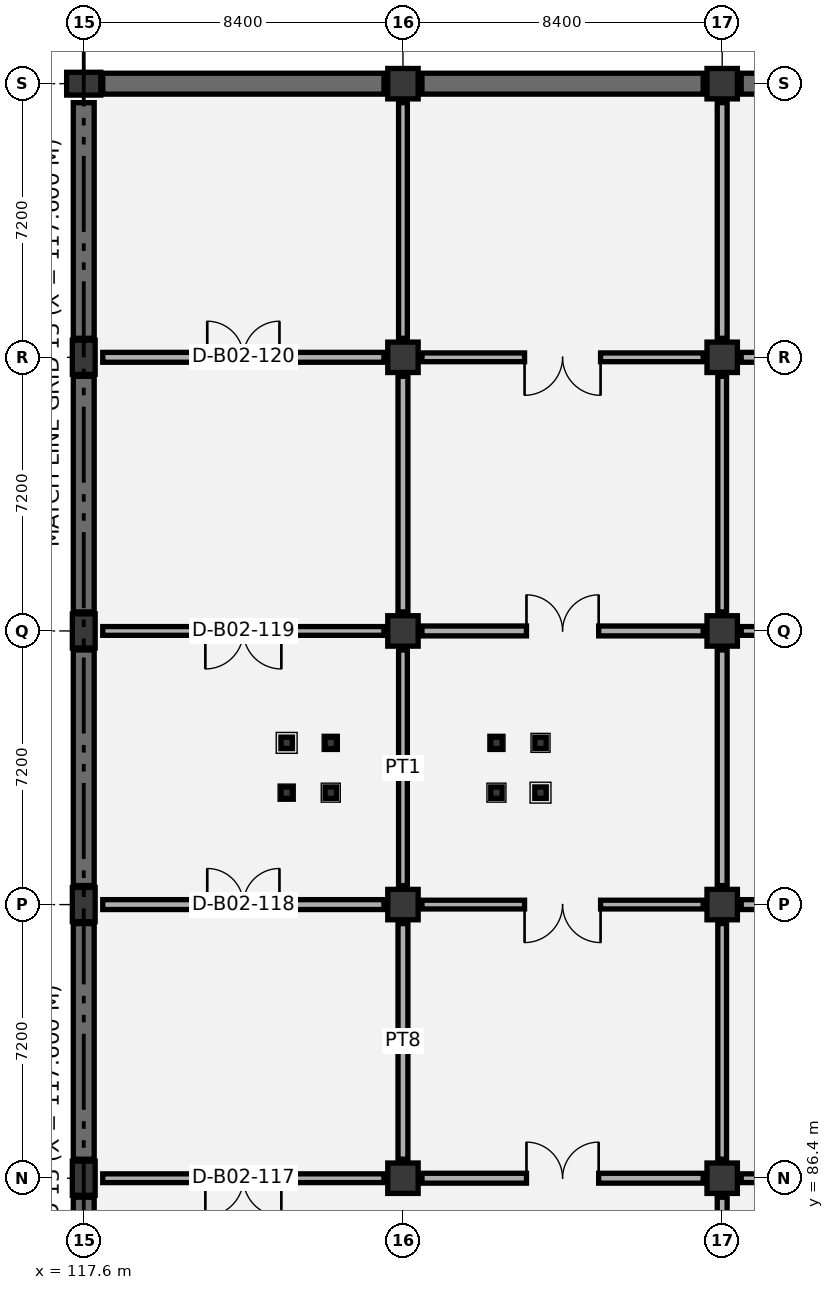
"""IFC4 building model, lengths in metres.
Left out: names, types, materials, properties, quantities, classifications, styles, units other than length and angle.
Written with IfcOpenShell. Run it as: python <this file> out.ifc"""

import sys

from ifc_helpers import new_model, si_unit, direction, frame, frame_2d, origin, origin_2d, place, context, subcontext, project, spatial, rectangle, i_section, extrude, element, fill, save


model = new_model("IFC4")
c1 = context("Model", 3, precision=1e-05, world=origin(), true_north=direction((0.0, 1.0)))
c2 = subcontext(c1, "Body", "Model", "MODEL_VIEW")
j1 = project(units=[si_unit("LENGTHUNIT", "METRE"), si_unit("PLANEANGLEUNIT", "RADIAN")], contexts=[c1])
p1 = place(None, origin())
s1 = spatial("IfcSite", under=j1, at=p1, CompositionType="ELEMENT")
p2 = place(p1, origin())
s2 = spatial("IfcBuilding", under=s1, at=p2, CompositionType="ELEMENT")
p3 = place(p2, frame((0.0, 0.0, -9.6)))
s3 = spatial("IfcBuildingStorey", under=s2, at=p3, CompositionType="ELEMENT", Elevation=-9.6)
for number, where, z_axis, x_axis in (
    (1, (117.6, 86.4, 0.0), (0.0, 0.0, 1.0), (1.0, 0.0, 0.0)),
    (2, (117.6, 93.6, 0.0), (0.0, 0.0, 1.0), (1.0, 0.0, 0.0)),
    (3, (117.6, 100.8, 0.0), (0.0, 0.0, 1.0), (1.0, 0.0, 0.0)),
    (4, (117.6, 108.0, 0.0), (0.0, 0.0, 1.0), (1.0, 0.0, 0.0)),
    (5, (117.6, 115.2, 0.0), (0.0, 0.0, 1.0), (0.0, 1.0, 0.0)),
):
    element("IfcColumn", number, at=place(p3, frame(where, z_axis=z_axis, x_axis=x_axis)), inside=s3, PredefinedType="COLUMN", context=c2, shape_type="SweptSolid", body=[
        extrude(rectangle(XDim=0.6, YDim=0.9, at=origin_2d()), origin(), (0.0, 0.0, 1.0), 4.8),
    ])
for number, where, z_axis, x_axis in (
    (6, (126.0, 86.4, 0.0), (0.0, 0.0, 1.0), (1.0, 0.0, 0.0)),
    (7, (126.0, 93.6, 0.0), (0.0, 0.0, 1.0), (1.0, 0.0, 0.0)),
    (8, (126.0, 100.8, 0.0), (0.0, 0.0, 1.0), (1.0, 0.0, 0.0)),
    (9, (126.0, 108.0, 0.0), (0.0, 0.0, 1.0), (1.0, 0.0, 0.0)),
    (10, (126.0, 115.2, 0.0), (0.0, 0.0, 1.0), (1.0, 0.0, 0.0)),
    (11, (134.4, 86.4, 0.0), (0.0, 0.0, 1.0), (1.0, 0.0, 0.0)),
    (12, (134.4, 93.6, 0.0), (0.0, 0.0, 1.0), (1.0, 0.0, 0.0)),
    (13, (134.4, 100.8, 0.0), (0.0, 0.0, 1.0), (1.0, 0.0, 0.0)),
    (14, (134.4, 108.0, 0.0), (0.0, 0.0, 1.0), (1.0, 0.0, 0.0)),
    (15, (134.4, 115.2, 0.0), (0.0, 0.0, 1.0), (1.0, 0.0, 0.0)),
):
    element("IfcColumn", number, at=place(p3, frame(where, z_axis=z_axis, x_axis=x_axis)), inside=s3, PredefinedType="COLUMN", context=c2, shape_type="SweptSolid", body=[
        extrude(rectangle(XDim=0.8, YDim=0.8, at=origin_2d()), origin(), (0.0, 0.0, 1.0), 4.8),
    ])
for number, where, z_axis, x_axis in (
    (16, (122.94, 96.545, 0.0), (0.0, 0.0, 1.0), (1.0, 0.0, 0.0)),
    (17, (124.1, 96.545, 0.0), (0.0, 0.0, 1.0), (1.0, 0.0, 0.0)),
    (18, (122.94, 97.855, 0.0), (0.0, 0.0, 1.0), (1.0, 0.0, 0.0)),
    (19, (124.1, 97.855, 0.0), (0.0, 0.0, 1.0), (1.0, 0.0, 0.0)),
    (20, (128.46, 96.545, 0.0), (0.0, 0.0, 1.0), (1.0, 0.0, 0.0)),
    (21, (129.62, 96.545, 0.0), (0.0, 0.0, 1.0), (1.0, 0.0, 0.0)),
    (22, (128.46, 97.855, 0.0), (0.0, 0.0, 1.0), (1.0, 0.0, 0.0)),
    (23, (129.62, 97.855, 0.0), (0.0, 0.0, 1.0), (1.0, 0.0, 0.0)),
):
    element("IfcColumn", number, at=place(p3, frame(where, z_axis=z_axis, x_axis=x_axis)), inside=s3, PredefinedType="COLUMN", context=c2, shape_type="SweptSolid", body=[
        extrude(i_section(OverallWidth=0.3, OverallDepth=0.3, WebThickness=0.011, FlangeThickness=0.019, FilletRadius=0.027, at=origin_2d()), origin(), (0.0, 0.0, 1.0), 4.4),
    ])
p4 = place(p3, frame((117.6, 79.7, 0.0), z_axis=(0.0, 0.0, 1.0), x_axis=(0.0, 1.0, 0.0)))
e24 = element("IfcWall", 24, at=p4, inside=s3, PredefinedType="USERDEFINED", context=c2, shape_type="SweptSolid", body=[
    extrude(rectangle(XDim=6.2, YDim=0.55, at=frame_2d((3.1, 0.0))), origin(), (0.0, 0.0, 1.0), 4.4),
])
p5 = place(p3, frame((117.6, 86.9, 0.0), z_axis=(0.0, 0.0, 1.0), x_axis=(0.0, 1.0, 0.0)))
e25 = element("IfcWall", 25, at=p5, inside=s3, PredefinedType="USERDEFINED", context=c2, shape_type="SweptSolid", body=[
    extrude(rectangle(XDim=6.2, YDim=0.55, at=frame_2d((3.1, 0.0))), origin(), (0.0, 0.0, 1.0), 4.4),
])
for number, where, z_axis, x_axis in (
    (26, (117.6, 94.1, 0.0), (0.0, 0.0, 1.0), (0.0, 1.0, 0.0)),
    (27, (117.6, 101.3, 0.0), (0.0, 0.0, 1.0), (0.0, 1.0, 0.0)),
):
    element("IfcWall", number, at=place(p3, frame(where, z_axis=z_axis, x_axis=x_axis)), inside=s3, PredefinedType="USERDEFINED", context=c2, shape_type="SweptSolid", body=[
        extrude(rectangle(XDim=6.2, YDim=0.55, at=frame_2d((3.1, 0.0))), origin(), (0.0, 0.0, 1.0), 4.4),
    ])
p6 = place(p3, frame((118.1, 115.2, 0.0), z_axis=(0.0, 0.0, 1.0), x_axis=(1.0, 0.0, 0.0)))
e28 = element("IfcWall", 28, at=p6, inside=s3, PredefinedType="USERDEFINED", context=c2, shape_type="SweptSolid", body=[
    extrude(rectangle(XDim=7.4, YDim=0.55, at=frame_2d((3.7, 0.0))), origin(), (0.0, 0.0, 1.0), 4.4),
])
p7 = place(p3, frame((117.6, 108.5, 0.0), z_axis=(0.0, 0.0, 1.0), x_axis=(0.0, 1.0, 0.0)))
e29 = element("IfcWall", 29, at=p7, inside=s3, PredefinedType="USERDEFINED", context=c2, shape_type="SweptSolid", body=[
    extrude(rectangle(XDim=6.2, YDim=0.55, at=frame_2d((3.1, 0.0))), origin(), (0.0, 0.0, 1.0), 4.4),
])
p8 = place(p3, frame((126.5, 115.2, 0.0), z_axis=(0.0, 0.0, 1.0), x_axis=(1.0, 0.0, 0.0)))
e30 = element("IfcWall", 30, at=p8, inside=s3, PredefinedType="USERDEFINED", context=c2, shape_type="SweptSolid", body=[
    extrude(rectangle(XDim=7.4, YDim=0.55, at=frame_2d((3.7, 0.0))), origin(), (0.0, 0.0, 1.0), 4.4),
])
p9 = place(p3, frame((134.9, 115.2, 0.0), z_axis=(0.0, 0.0, 1.0), x_axis=(1.0, 0.0, 0.0)))
e31 = element("IfcWall", 31, at=p9, inside=s3, PredefinedType="USERDEFINED", context=c2, shape_type="SweptSolid", body=[
    extrude(rectangle(XDim=7.4, YDim=0.55, at=frame_2d((3.7, 0.0))), origin(), (0.0, 0.0, 1.0), 4.4),
])
p10 = place(p3, frame((118.1, 86.4, 0.0), z_axis=(0.0, 0.0, 1.0), x_axis=(1.0, 0.0, 0.0)))
e32 = element("IfcWall", 32, at=p10, inside=s3, PredefinedType="PARTITIONING", context=c2, shape_type="SweptSolid", body=[
    extrude(rectangle(XDim=7.4, YDim=0.23, at=frame_2d((3.7, 0.0))), origin(), (0.0, 0.0, 1.0), 3.495),
])
p11 = place(p10, frame((2.7, 0.0, 0.0)))
e33 = element("IfcOpeningElement", 33, at=p11, cuts=e32, PredefinedType="OPENING", context=c2, shape_type="SweptSolid", body=[
    extrude(rectangle(XDim=2.0, YDim=2.35, at=frame_2d((1.0, 1.175))), frame((0.0, 0.125, 0.0), z_axis=(0.0, -1.0, 0.0), x_axis=(1.0, 0.0, 0.0)), (0.0, 0.0, 1.0), 0.25),
])
p12 = place(p3, frame((126.0, 86.9, 0.0), z_axis=(0.0, 0.0, 1.0), x_axis=(0.0, 1.0, 0.0)))
e34 = element("IfcWall", 34, at=p12, inside=s3, PredefinedType="PARTITIONING", context=c2, shape_type="SweptSolid", body=[
    extrude(rectangle(XDim=6.2, YDim=0.26, at=frame_2d((3.1, 0.0))), origin(), (0.0, 0.0, 1.0), 3.595),
])
p13 = place(p3, frame((118.1, 93.6, 0.0), z_axis=(0.0, 0.0, 1.0), x_axis=(1.0, 0.0, 0.0)))
e35 = element("IfcWall", 35, at=p13, inside=s3, PredefinedType="PARTITIONING", context=c2, shape_type="SweptSolid", body=[
    extrude(rectangle(XDim=7.4, YDim=0.26, at=frame_2d((3.7, 0.0))), origin(), (0.0, 0.0, 1.0), 3.495),
])
p14 = place(p13, frame((2.75, 0.0, 0.0)))
e36 = element("IfcOpeningElement", 36, at=p14, cuts=e35, PredefinedType="OPENING", context=c2, shape_type="SweptSolid", body=[
    extrude(rectangle(XDim=1.9, YDim=2.3, at=frame_2d((0.95, 1.15))), frame((0.0, 0.14, 0.0), z_axis=(0.0, -1.0, 0.0), x_axis=(1.0, 0.0, 0.0)), (0.0, 0.0, 1.0), 0.28),
])
p15 = place(p3, frame((126.0, 94.1, 0.0), z_axis=(0.0, 0.0, 1.0), x_axis=(0.0, 1.0, 0.0)))
e37 = element("IfcWall", 37, at=p15, inside=s3, PredefinedType="PARTITIONING", context=c2, shape_type="SweptSolid", body=[
    extrude(rectangle(XDim=6.2, YDim=0.23, at=frame_2d((3.1, 0.0))), origin(), (0.0, 0.0, 1.0), 3.595),
])
p16 = place(p3, frame((118.1, 100.8, 0.0), z_axis=(0.0, 0.0, 1.0), x_axis=(1.0, 0.0, 0.0)))
e38 = element("IfcWall", 38, at=p16, inside=s3, PredefinedType="PARTITIONING", context=c2, shape_type="SweptSolid", body=[
    extrude(rectangle(XDim=7.4, YDim=0.23, at=frame_2d((3.7, 0.0))), origin(), (0.0, 0.0, 1.0), 3.495),
])
p17 = place(p16, frame((2.7, 0.0, 0.0)))
e39 = element("IfcOpeningElement", 39, at=p17, cuts=e38, PredefinedType="OPENING", context=c2, shape_type="SweptSolid", body=[
    extrude(rectangle(XDim=2.0, YDim=2.35, at=frame_2d((1.0, 1.175))), frame((0.0, 0.125, 0.0), z_axis=(0.0, -1.0, 0.0), x_axis=(1.0, 0.0, 0.0)), (0.0, 0.0, 1.0), 0.25),
])
p18 = place(p3, frame((126.0, 101.3, 0.0), z_axis=(0.0, 0.0, 1.0), x_axis=(0.0, 1.0, 0.0)))
e40 = element("IfcWall", 40, at=p18, inside=s3, PredefinedType="PARTITIONING", context=c2, shape_type="SweptSolid", body=[
    extrude(rectangle(XDim=6.2, YDim=0.26, at=frame_2d((3.1, 0.0))), origin(), (0.0, 0.0, 1.0), 3.595),
])
p19 = place(p3, frame((118.1, 108.0, 0.0), z_axis=(0.0, 0.0, 1.0), x_axis=(1.0, 0.0, 0.0)))
e41 = element("IfcWall", 41, at=p19, inside=s3, PredefinedType="PARTITIONING", context=c2, shape_type="SweptSolid", body=[
    extrude(rectangle(XDim=7.4, YDim=0.26, at=frame_2d((3.7, 0.0))), origin(), (0.0, 0.0, 1.0), 3.495),
])
p20 = place(p19, frame((2.75, 0.0, 0.0)))
e42 = element("IfcOpeningElement", 42, at=p20, cuts=e41, PredefinedType="OPENING", context=c2, shape_type="SweptSolid", body=[
    extrude(rectangle(XDim=1.9, YDim=2.3, at=frame_2d((0.95, 1.15))), frame((0.0, 0.14, 0.0), z_axis=(0.0, -1.0, 0.0), x_axis=(1.0, 0.0, 0.0)), (0.0, 0.0, 1.0), 0.28),
])
p21 = place(p3, frame((126.0, 108.5, 0.0), z_axis=(0.0, 0.0, 1.0), x_axis=(0.0, 1.0, 0.0)))
e43 = element("IfcWall", 43, at=p21, inside=s3, PredefinedType="PARTITIONING", context=c2, shape_type="SweptSolid", body=[
    extrude(rectangle(XDim=6.2, YDim=0.23, at=frame_2d((3.1, 0.0))), origin(), (0.0, 0.0, 1.0), 3.595),
])
p22 = place(p3, frame((134.4, 79.7, 0.0), z_axis=(0.0, 0.0, 1.0), x_axis=(0.0, 1.0, 0.0)))
e44 = element("IfcWall", 44, at=p22, inside=s3, PredefinedType="PARTITIONING", context=c2, shape_type="SweptSolid", body=[
    extrude(rectangle(XDim=6.2, YDim=0.26, at=frame_2d((3.1, 0.0))), origin(), (0.0, 0.0, 1.0), 3.595),
])
p23 = place(p22, frame((2.1, 0.0, 0.0)))
e45 = element("IfcOpeningElement", 45, at=p23, cuts=e44, PredefinedType="OPENING", context=c2, shape_type="SweptSolid", body=[
    extrude(rectangle(XDim=2.0, YDim=2.35, at=frame_2d((1.0, 1.175))), frame((0.0, 0.14, 0.0), z_axis=(0.0, -1.0, 0.0), x_axis=(1.0, 0.0, 0.0)), (0.0, 0.0, 1.0), 0.28),
])
p24 = place(p3, frame((126.5, 86.4, 0.0), z_axis=(0.0, 0.0, 1.0), x_axis=(1.0, 0.0, 0.0)))
e46 = element("IfcWall", 46, at=p24, inside=s3, PredefinedType="PARTITIONING", context=c2, shape_type="SweptSolid", body=[
    extrude(rectangle(XDim=7.4, YDim=0.26, at=frame_2d((3.7, 0.0))), origin(), (0.0, 0.0, 1.0), 3.495),
])
p25 = place(p24, frame((2.75, 0.0, 0.0)))
e47 = element("IfcOpeningElement", 47, at=p25, cuts=e46, PredefinedType="OPENING", context=c2, shape_type="SweptSolid", body=[
    extrude(rectangle(XDim=1.9, YDim=2.3, at=frame_2d((0.95, 1.15))), frame((0.0, 0.14, 0.0), z_axis=(0.0, -1.0, 0.0), x_axis=(1.0, 0.0, 0.0)), (0.0, 0.0, 1.0), 0.28),
])
p26 = place(p3, frame((134.4, 86.9, 0.0), z_axis=(0.0, 0.0, 1.0), x_axis=(0.0, 1.0, 0.0)))
e48 = element("IfcWall", 48, at=p26, inside=s3, PredefinedType="PARTITIONING", context=c2, shape_type="SweptSolid", body=[
    extrude(rectangle(XDim=6.2, YDim=0.23, at=frame_2d((3.1, 0.0))), origin(), (0.0, 0.0, 1.0), 3.595),
])
p27 = place(p3, frame((126.5, 93.6, 0.0), z_axis=(0.0, 0.0, 1.0), x_axis=(1.0, 0.0, 0.0)))
e49 = element("IfcWall", 49, at=p27, inside=s3, PredefinedType="PARTITIONING", context=c2, shape_type="SweptSolid", body=[
    extrude(rectangle(XDim=7.4, YDim=0.23, at=frame_2d((3.7, 0.0))), origin(), (0.0, 0.0, 1.0), 3.495),
])
p28 = place(p27, frame((2.7, 0.0, 0.0)))
e50 = element("IfcOpeningElement", 50, at=p28, cuts=e49, PredefinedType="OPENING", context=c2, shape_type="SweptSolid", body=[
    extrude(rectangle(XDim=2.0, YDim=2.35, at=frame_2d((1.0, 1.175))), frame((0.0, 0.125, 0.0), z_axis=(0.0, -1.0, 0.0), x_axis=(1.0, 0.0, 0.0)), (0.0, 0.0, 1.0), 0.25),
])
p29 = place(p3, frame((134.4, 94.1, 0.0), z_axis=(0.0, 0.0, 1.0), x_axis=(0.0, 1.0, 0.0)))
e51 = element("IfcWall", 51, at=p29, inside=s3, PredefinedType="PARTITIONING", context=c2, shape_type="SweptSolid", body=[
    extrude(rectangle(XDim=6.2, YDim=0.26, at=frame_2d((3.1, 0.0))), origin(), (0.0, 0.0, 1.0), 3.595),
])
p30 = place(p3, frame((126.5, 100.8, 0.0), z_axis=(0.0, 0.0, 1.0), x_axis=(1.0, 0.0, 0.0)))
e52 = element("IfcWall", 52, at=p30, inside=s3, PredefinedType="PARTITIONING", context=c2, shape_type="SweptSolid", body=[
    extrude(rectangle(XDim=7.4, YDim=0.26, at=frame_2d((3.7, 0.0))), origin(), (0.0, 0.0, 1.0), 3.495),
])
p31 = place(p30, frame((2.75, 0.0, 0.0)))
e53 = element("IfcOpeningElement", 53, at=p31, cuts=e52, PredefinedType="OPENING", context=c2, shape_type="SweptSolid", body=[
    extrude(rectangle(XDim=1.9, YDim=2.3, at=frame_2d((0.95, 1.15))), frame((0.0, 0.14, 0.0), z_axis=(0.0, -1.0, 0.0), x_axis=(1.0, 0.0, 0.0)), (0.0, 0.0, 1.0), 0.28),
])
p32 = place(p3, frame((134.4, 101.3, 0.0), z_axis=(0.0, 0.0, 1.0), x_axis=(0.0, 1.0, 0.0)))
e54 = element("IfcWall", 54, at=p32, inside=s3, PredefinedType="PARTITIONING", context=c2, shape_type="SweptSolid", body=[
    extrude(rectangle(XDim=6.2, YDim=0.23, at=frame_2d((3.1, 0.0))), origin(), (0.0, 0.0, 1.0), 3.595),
])
p33 = place(p3, frame((126.5, 108.0, 0.0), z_axis=(0.0, 0.0, 1.0), x_axis=(1.0, 0.0, 0.0)))
e55 = element("IfcWall", 55, at=p33, inside=s3, PredefinedType="PARTITIONING", context=c2, shape_type="SweptSolid", body=[
    extrude(rectangle(XDim=7.4, YDim=0.23, at=frame_2d((3.7, 0.0))), origin(), (0.0, 0.0, 1.0), 3.495),
])
p34 = place(p33, frame((2.7, 0.0, 0.0)))
e56 = element("IfcOpeningElement", 56, at=p34, cuts=e55, PredefinedType="OPENING", context=c2, shape_type="SweptSolid", body=[
    extrude(rectangle(XDim=2.0, YDim=2.35, at=frame_2d((1.0, 1.175))), frame((0.0, 0.125, 0.0), z_axis=(0.0, -1.0, 0.0), x_axis=(1.0, 0.0, 0.0)), (0.0, 0.0, 1.0), 0.25),
])
p35 = place(p3, frame((134.4, 108.5, 0.0), z_axis=(0.0, 0.0, 1.0), x_axis=(0.0, 1.0, 0.0)))
e57 = element("IfcWall", 57, at=p35, inside=s3, PredefinedType="PARTITIONING", context=c2, shape_type="SweptSolid", body=[
    extrude(rectangle(XDim=6.2, YDim=0.26, at=frame_2d((3.1, 0.0))), origin(), (0.0, 0.0, 1.0), 3.595),
])
p36 = place(p3, frame((134.9, 86.4, 0.0), z_axis=(0.0, 0.0, 1.0), x_axis=(1.0, 0.0, 0.0)))
e58 = element("IfcWall", 58, at=p36, inside=s3, PredefinedType="PARTITIONING", context=c2, shape_type="SweptSolid", body=[
    extrude(rectangle(XDim=7.4, YDim=0.23, at=frame_2d((3.7, 0.0))), origin(), (0.0, 0.0, 1.0), 3.495),
])
p37 = place(p36, frame((2.75, 0.0, 0.0)))
e59 = element("IfcOpeningElement", 59, at=p37, cuts=e58, PredefinedType="OPENING", context=c2, shape_type="SweptSolid", body=[
    extrude(rectangle(XDim=1.9, YDim=2.3, at=frame_2d((0.95, 1.15))), frame((0.0, 0.125, 0.0), z_axis=(0.0, -1.0, 0.0), x_axis=(1.0, 0.0, 0.0)), (0.0, 0.0, 1.0), 0.25),
])
p38 = place(p3, frame((134.9, 93.6, 0.0), z_axis=(0.0, 0.0, 1.0), x_axis=(1.0, 0.0, 0.0)))
e60 = element("IfcWall", 60, at=p38, inside=s3, PredefinedType="PARTITIONING", context=c2, shape_type="SweptSolid", body=[
    extrude(rectangle(XDim=7.4, YDim=0.26, at=frame_2d((3.7, 0.0))), origin(), (0.0, 0.0, 1.0), 3.495),
])
p39 = place(p38, frame((2.7, 0.0, 0.0)))
e61 = element("IfcOpeningElement", 61, at=p39, cuts=e60, PredefinedType="OPENING", context=c2, shape_type="SweptSolid", body=[
    extrude(rectangle(XDim=2.0, YDim=2.35, at=frame_2d((1.0, 1.175))), frame((0.0, 0.14, 0.0), z_axis=(0.0, -1.0, 0.0), x_axis=(1.0, 0.0, 0.0)), (0.0, 0.0, 1.0), 0.28),
])
p40 = place(p3, frame((134.9, 100.8, 0.0), z_axis=(0.0, 0.0, 1.0), x_axis=(1.0, 0.0, 0.0)))
e62 = element("IfcWall", 62, at=p40, inside=s3, PredefinedType="PARTITIONING", context=c2, shape_type="SweptSolid", body=[
    extrude(rectangle(XDim=7.4, YDim=0.23, at=frame_2d((3.7, 0.0))), origin(), (0.0, 0.0, 1.0), 3.495),
])
p41 = place(p40, frame((2.75, 0.0, 0.0)))
e63 = element("IfcOpeningElement", 63, at=p41, cuts=e62, PredefinedType="OPENING", context=c2, shape_type="SweptSolid", body=[
    extrude(rectangle(XDim=1.9, YDim=2.3, at=frame_2d((0.95, 1.15))), frame((0.0, 0.125, 0.0), z_axis=(0.0, -1.0, 0.0), x_axis=(1.0, 0.0, 0.0)), (0.0, 0.0, 1.0), 0.25),
])
p42 = place(p3, frame((134.9, 108.0, 0.0), z_axis=(0.0, 0.0, 1.0), x_axis=(1.0, 0.0, 0.0)))
e64 = element("IfcWall", 64, at=p42, inside=s3, PredefinedType="PARTITIONING", context=c2, shape_type="SweptSolid", body=[
    extrude(rectangle(XDim=7.4, YDim=0.26, at=frame_2d((3.7, 0.0))), origin(), (0.0, 0.0, 1.0), 3.495),
])
p43 = place(p42, frame((2.7, 0.0, 0.0)))
e65 = element("IfcOpeningElement", 65, at=p43, cuts=e64, PredefinedType="OPENING", context=c2, shape_type="SweptSolid", body=[
    extrude(rectangle(XDim=2.0, YDim=2.35, at=frame_2d((1.0, 1.175))), frame((0.0, 0.14, 0.0), z_axis=(0.0, -1.0, 0.0), x_axis=(1.0, 0.0, 0.0)), (0.0, 0.0, 1.0), 0.28),
])
p44 = place(p11, frame((2.0, 0.0, 0.0), z_axis=(0.0, 0.0, 1.0), x_axis=(-1.0, 0.0, 0.0)))
e66 = element("IfcDoor", 66, at=p44, inside=s3, OperationType="DOUBLE_DOOR_SINGLE_SWING", PredefinedType="DOOR", context=c2, shape_type="SweptSolid", body=[
    extrude(rectangle(XDim=2.0, YDim=2.35, at=frame_2d((1.0, 1.175))), frame((0.0, 0.025, 0.0), z_axis=(0.0, -1.0, 0.0), x_axis=(1.0, 0.0, 0.0)), (0.0, 0.0, 1.0), 0.05),
])
fill(e33, e66)
p45 = place(p14, origin())
e67 = element("IfcDoor", 67, at=p45, inside=s3, OperationType="DOUBLE_DOOR_SINGLE_SWING", PredefinedType="DOOR", context=c2, shape_type="SweptSolid", body=[
    extrude(rectangle(XDim=1.9, YDim=2.3, at=frame_2d((0.95, 1.15))), frame((0.0, 0.025, 0.0), z_axis=(0.0, -1.0, 0.0), x_axis=(1.0, 0.0, 0.0)), (0.0, 0.0, 1.0), 0.05),
])
fill(e36, e67)
p46 = place(p17, frame((2.0, 0.0, 0.0), z_axis=(0.0, 0.0, 1.0), x_axis=(-1.0, 0.0, 0.0)))
e68 = element("IfcDoor", 68, at=p46, inside=s3, OperationType="DOUBLE_DOOR_SINGLE_SWING", PredefinedType="DOOR", context=c2, shape_type="SweptSolid", body=[
    extrude(rectangle(XDim=2.0, YDim=2.35, at=frame_2d((1.0, 1.175))), frame((0.0, 0.025, 0.0), z_axis=(0.0, -1.0, 0.0), x_axis=(1.0, 0.0, 0.0)), (0.0, 0.0, 1.0), 0.05),
])
fill(e39, e68)
p47 = place(p20, origin())
e69 = element("IfcDoor", 69, at=p47, inside=s3, OperationType="DOUBLE_DOOR_SINGLE_SWING", PredefinedType="DOOR", context=c2, shape_type="SweptSolid", body=[
    extrude(rectangle(XDim=1.9, YDim=2.3, at=frame_2d((0.95, 1.15))), frame((0.0, 0.025, 0.0), z_axis=(0.0, -1.0, 0.0), x_axis=(1.0, 0.0, 0.0)), (0.0, 0.0, 1.0), 0.05),
])
fill(e42, e69)
p48 = place(p25, origin())
e70 = element("IfcDoor", 70, at=p48, inside=s3, OperationType="DOUBLE_DOOR_SINGLE_SWING", PredefinedType="DOOR", context=c2, shape_type="SweptSolid", body=[
    extrude(rectangle(XDim=1.9, YDim=2.3, at=frame_2d((0.95, 1.15))), frame((0.0, 0.025, 0.0), z_axis=(0.0, -1.0, 0.0), x_axis=(1.0, 0.0, 0.0)), (0.0, 0.0, 1.0), 0.05),
])
fill(e47, e70)
p49 = place(p28, frame((2.0, 0.0, 0.0), z_axis=(0.0, 0.0, 1.0), x_axis=(-1.0, 0.0, 0.0)))
e71 = element("IfcDoor", 71, at=p49, inside=s3, OperationType="DOUBLE_DOOR_SINGLE_SWING", PredefinedType="DOOR", context=c2, shape_type="SweptSolid", body=[
    extrude(rectangle(XDim=2.0, YDim=2.35, at=frame_2d((1.0, 1.175))), frame((0.0, 0.025, 0.0), z_axis=(0.0, -1.0, 0.0), x_axis=(1.0, 0.0, 0.0)), (0.0, 0.0, 1.0), 0.05),
])
fill(e50, e71)
p50 = place(p31, origin())
e72 = element("IfcDoor", 72, at=p50, inside=s3, OperationType="DOUBLE_DOOR_SINGLE_SWING", PredefinedType="DOOR", context=c2, shape_type="SweptSolid", body=[
    extrude(rectangle(XDim=1.9, YDim=2.3, at=frame_2d((0.95, 1.15))), frame((0.0, 0.025, 0.0), z_axis=(0.0, -1.0, 0.0), x_axis=(1.0, 0.0, 0.0)), (0.0, 0.0, 1.0), 0.05),
])
fill(e53, e72)
p51 = place(p34, frame((2.0, 0.0, 0.0), z_axis=(0.0, 0.0, 1.0), x_axis=(-1.0, 0.0, 0.0)))
e73 = element("IfcDoor", 73, at=p51, inside=s3, OperationType="DOUBLE_DOOR_SINGLE_SWING", PredefinedType="DOOR", context=c2, shape_type="SweptSolid", body=[
    extrude(rectangle(XDim=2.0, YDim=2.35, at=frame_2d((1.0, 1.175))), frame((0.0, 0.025, 0.0), z_axis=(0.0, -1.0, 0.0), x_axis=(1.0, 0.0, 0.0)), (0.0, 0.0, 1.0), 0.05),
])
fill(e56, e73)
save(model, sys.argv[1])
